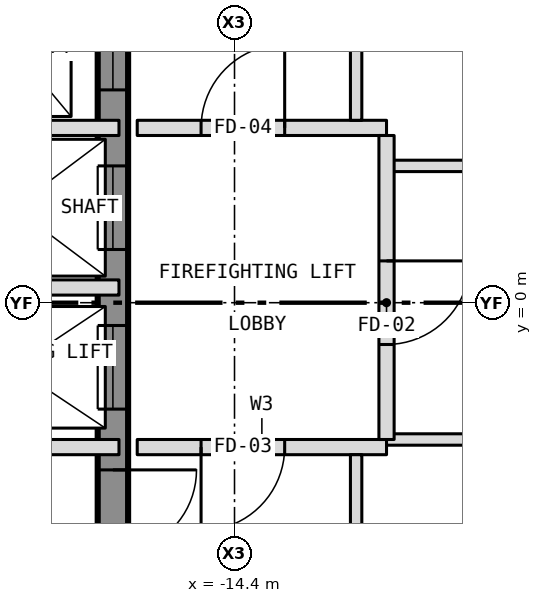
"""IFC4 building model, lengths in metres.
Left out: names, types, materials, properties, quantities, classifications, styles, units other than length and angle.
Written with IfcOpenShell. Run it as: python <this file> out.ifc"""

import sys

from ifc_helpers import new_model, si_unit, direction, frame, frame_2d, origin, place, context, subcontext, project, spatial, rectangle, extrude, element, fill, save


model = new_model("IFC4")
c1 = context("Model", 3, precision=1e-05, world=origin(), true_north=direction((0.0, 1.0)))
c2 = subcontext(c1, "Body", "Model", "MODEL_VIEW")
j1 = project(units=[si_unit("LENGTHUNIT", "METRE"), si_unit("PLANEANGLEUNIT", "RADIAN")], contexts=[c1])
p1 = place(None, origin())
s1 = spatial("IfcSite", under=j1, at=p1, CompositionType="ELEMENT")
p2 = place(p1, origin())
s2 = spatial("IfcBuilding", under=s1, at=p2, CompositionType="ELEMENT")
p3 = place(p2, frame((0.0, 0.0, 233.0)))
s3 = spatial("IfcBuildingStorey", under=s2, at=p3, CompositionType="ELEMENT", Elevation=233.0)
p4 = place(p3, frame((-16.0, -10.8, 0.0), z_axis=(0.0, 0.0, 1.0), x_axis=(0.0, 1.0, 0.0)))
e1 = element("IfcWall", 1, at=p4, inside=s3, PredefinedType="SHEAR", context=c2, shape_type="SweptSolid", body=[
    extrude(rectangle(XDim=21.6, YDim=0.4, at=frame_2d((10.8, 0.0))), origin(), (0.0, 0.0, 1.0), 2.9),
])
p5 = place(p4, frame((9.4, 0.0, 0.0)))
e2 = element("IfcOpeningElement", 2, at=p5, cuts=e1, PredefinedType="OPENING", context=c2, shape_type="SweptSolid", body=[
    extrude(rectangle(XDim=1.1, YDim=2.1, at=frame_2d((0.55, 1.05))), frame((0.0, 0.212, 0.0), z_axis=(0.0, -1.0, 0.0), x_axis=(1.0, 0.0, 0.0)), (0.0, 0.0, 1.0), 0.424),
])
p6 = place(p4, frame((11.5, 0.0, 0.0)))
e3 = element("IfcOpeningElement", 3, at=p6, cuts=e1, PredefinedType="OPENING", context=c2, shape_type="SweptSolid", body=[
    extrude(rectangle(XDim=1.1, YDim=2.1, at=frame_2d((0.55, 1.05))), frame((0.0, 0.212, 0.0), z_axis=(0.0, -1.0, 0.0), x_axis=(1.0, 0.0, 0.0)), (0.0, 0.0, 1.0), 0.424),
])
p7 = place(p4, frame((13.6, 0.0, 0.0)))
e4 = element("IfcOpeningElement", 4, at=p7, cuts=e1, PredefinedType="OPENING", context=c2, shape_type="SweptSolid", body=[
    extrude(rectangle(XDim=1.1, YDim=2.1, at=frame_2d((0.55, 1.05))), frame((0.0, 0.212, 0.0), z_axis=(0.0, -1.0, 0.0), x_axis=(1.0, 0.0, 0.0)), (0.0, 0.0, 1.0), 0.424),
])
p8 = place(p4, frame((15.7, 0.0, 0.0)))
e5 = element("IfcOpeningElement", 5, at=p8, cuts=e1, PredefinedType="OPENING", context=c2, shape_type="SweptSolid", body=[
    extrude(rectangle(XDim=1.1, YDim=2.1, at=frame_2d((0.55, 1.05))), frame((0.0, 0.212, 0.0), z_axis=(0.0, -1.0, 0.0), x_axis=(1.0, 0.0, 0.0)), (0.0, 0.0, 1.0), 0.424),
])
p9 = place(p4, frame((17.8, 0.0, 0.0)))
e6 = element("IfcOpeningElement", 6, at=p9, cuts=e1, PredefinedType="OPENING", context=c2, shape_type="SweptSolid", body=[
    extrude(rectangle(XDim=1.1, YDim=2.1, at=frame_2d((0.55, 1.05))), frame((0.0, 0.212, 0.0), z_axis=(0.0, -1.0, 0.0), x_axis=(1.0, 0.0, 0.0)), (0.0, 0.0, 1.0), 0.424),
])
p10 = place(p4, frame((0.458, 0.0, 0.0)))
e7 = element("IfcOpeningElement", 7, at=p10, cuts=e1, PredefinedType="OPENING", context=c2, shape_type="SweptSolid", body=[
    extrude(rectangle(XDim=1.1, YDim=2.1, at=frame_2d((0.55, 1.05))), frame((0.0, 0.212, 0.0), z_axis=(0.0, -1.0, 0.0), x_axis=(1.0, 0.0, 0.0)), (0.0, 0.0, 1.0), 0.424),
])
p11 = place(p4, frame((7.5, 0.0, 0.0)))
e8 = element("IfcOpeningElement", 8, at=p11, cuts=e1, PredefinedType="OPENING", context=c2, shape_type="SweptSolid", body=[
    extrude(rectangle(XDim=1.1, YDim=2.1, at=frame_2d((0.55, 1.05))), frame((0.0, 0.212, 0.0), z_axis=(0.0, -1.0, 0.0), x_axis=(1.0, 0.0, 0.0)), (0.0, 0.0, 1.0), 0.424),
])
p12 = place(p4, frame((20.0, 0.0, 0.0)))
e9 = element("IfcOpeningElement", 9, at=p12, cuts=e1, PredefinedType="OPENING", context=c2, shape_type="SweptSolid", body=[
    extrude(rectangle(XDim=0.9, YDim=2.1, at=frame_2d((0.45, 1.05))), frame((0.0, 0.212, 0.0), z_axis=(0.0, -1.0, 0.0), x_axis=(1.0, 0.0, 0.0)), (0.0, 0.0, 1.0), 0.424),
])
p13 = place(p3, frame((-20.28, -1.9, 0.0), z_axis=(0.0, 0.0, 1.0), x_axis=(1.0, 0.0, 0.0)))
e10 = element("IfcWall", 10, at=p13, inside=s3, PredefinedType="PARTITIONING", context=c2, shape_type="SweptSolid", body=[
    extrude(rectangle(XDim=4.36, YDim=0.2, at=frame_2d((2.18, 0.0))), origin(), (0.0, 0.0, 1.0), 2.9),
])
p14 = place(p3, frame((-15.68, -1.9, 0.0), z_axis=(0.0, 0.0, 1.0), x_axis=(1.0, 0.0, 0.0)))
e11 = element("IfcWall", 11, at=p14, inside=s3, PredefinedType="PARTITIONING", context=c2, shape_type="SweptSolid", body=[
    extrude(rectangle(XDim=3.28, YDim=0.2, at=frame_2d((1.64, 0.0))), origin(), (0.0, 0.0, 1.0), 3.2),
])
p15 = place(p14, frame((0.84, 0.0, 0.0)))
e12 = element("IfcOpeningElement", 12, at=p15, cuts=e11, PredefinedType="OPENING", context=c2, shape_type="SweptSolid", body=[
    extrude(rectangle(XDim=1.1, YDim=2.1, at=frame_2d((0.55, 1.05))), frame((0.0, 0.112, 0.0), z_axis=(0.0, -1.0, 0.0), x_axis=(1.0, 0.0, 0.0)), (0.0, 0.0, 1.0), 0.224),
])
p16 = place(p3, frame((-12.4, -1.8, 0.0), z_axis=(0.0, 0.0, 1.0), x_axis=(1.0, 0.0, 0.0)))
e13 = element("IfcWall", 13, at=p16, inside=s3, PredefinedType="PARTITIONING", context=c2, shape_type="SweptSolid", body=[
    extrude(rectangle(XDim=5.78, YDim=0.15, at=frame_2d((2.89, 0.0))), origin(), (0.0, 0.0, 1.0), 3.2),
])
p17 = place(p3, frame((-18.8, 0.2, 0.0), z_axis=(0.0, 0.0, 1.0), x_axis=(1.0, 0.0, 0.0)))
e14 = element("IfcWall", 14, at=p17, inside=s3, PredefinedType="PARTITIONING", context=c2, shape_type="SweptSolid", body=[
    extrude(rectangle(XDim=2.88, YDim=0.2, at=frame_2d((1.44, 0.0))), origin(), (0.0, 0.0, 1.0), 2.9),
])
p18 = place(p3, frame((-12.4, 1.8, 0.0), z_axis=(0.0, 0.0, 1.0), x_axis=(1.0, 0.0, 0.0)))
e15 = element("IfcWall", 15, at=p18, inside=s3, PredefinedType="PARTITIONING", context=c2, shape_type="SweptSolid", body=[
    extrude(rectangle(XDim=5.78, YDim=0.15, at=frame_2d((2.89, 0.0))), origin(), (0.0, 0.0, 1.0), 3.2),
])
p19 = place(p3, frame((-18.8, 2.3, 0.0), z_axis=(0.0, 0.0, 1.0), x_axis=(1.0, 0.0, 0.0)))
e16 = element("IfcWall", 16, at=p19, inside=s3, PredefinedType="PARTITIONING", context=c2, shape_type="SweptSolid", body=[
    extrude(rectangle(XDim=2.88, YDim=0.2, at=frame_2d((1.44, 0.0))), origin(), (0.0, 0.0, 1.0), 2.9),
])
p20 = place(p3, frame((-15.68, 2.3, 0.0), z_axis=(0.0, 0.0, 1.0), x_axis=(1.0, 0.0, 0.0)))
e17 = element("IfcWall", 17, at=p20, inside=s3, PredefinedType="PARTITIONING", context=c2, shape_type="SweptSolid", body=[
    extrude(rectangle(XDim=3.28, YDim=0.2, at=frame_2d((1.64, 0.0))), origin(), (0.0, 0.0, 1.0), 3.2),
])
p21 = place(p20, frame((0.84, 0.0, 0.0)))
e18 = element("IfcOpeningElement", 18, at=p21, cuts=e17, PredefinedType="OPENING", context=c2, shape_type="SweptSolid", body=[
    extrude(rectangle(XDim=1.1, YDim=2.1, at=frame_2d((0.55, 1.05))), frame((0.0, 0.112, 0.0), z_axis=(0.0, -1.0, 0.0), x_axis=(1.0, 0.0, 0.0)), (0.0, 0.0, 1.0), 0.224),
])
p22 = place(p3, frame((-12.8, -10.525, 0.0), z_axis=(0.0, 0.0, 1.0), x_axis=(0.0, 1.0, 0.0)))
e19 = element("IfcWall", 19, at=p22, inside=s3, PredefinedType="PARTITIONING", context=c2, shape_type="SweptSolid", body=[
    extrude(rectangle(XDim=8.525, YDim=0.15, at=frame_2d((4.262, 0.0))), origin(), (0.0, 0.0, 1.0), 3.2),
])
p23 = place(p22, frame((3.825, 0.0, 0.0)))
e20 = element("IfcOpeningElement", 20, at=p23, cuts=e19, PredefinedType="OPENING", context=c2, shape_type="SweptSolid", body=[
    extrude(rectangle(XDim=0.9, YDim=2.1, at=frame_2d((0.45, 1.05))), frame((0.0, 0.087, 0.0), z_axis=(0.0, -1.0, 0.0), x_axis=(1.0, 0.0, 0.0)), (0.0, 0.0, 1.0), 0.174),
])
p24 = place(p3, frame((-12.8, 2.4, 0.0), z_axis=(0.0, 0.0, 1.0), x_axis=(0.0, 1.0, 0.0)))
e21 = element("IfcWall", 21, at=p24, inside=s3, PredefinedType="PARTITIONING", context=c2, shape_type="SweptSolid", body=[
    extrude(rectangle(XDim=3.425, YDim=0.15, at=frame_2d((1.712, 0.0))), origin(), (0.0, 0.0, 1.0), 3.2),
])
p25 = place(p3, frame((-12.4, -1.8, 0.0), z_axis=(0.0, 0.0, 1.0), x_axis=(0.0, 1.0, 0.0)))
e22 = element("IfcWall", 22, at=p25, inside=s3, PredefinedType="PARTITIONING", context=c2, shape_type="SweptSolid", body=[
    extrude(rectangle(XDim=4.0, YDim=0.2, at=frame_2d((2.0, 0.0))), origin(), (0.0, 0.0, 1.0), 3.2),
])
p26 = place(p25, frame((1.25, 0.0, 0.0)))
e23 = element("IfcOpeningElement", 23, at=p26, cuts=e22, PredefinedType="OPENING", context=c2, shape_type="SweptSolid", body=[
    extrude(rectangle(XDim=1.1, YDim=2.1, at=frame_2d((0.55, 1.05))), frame((0.0, 0.112, 0.0), z_axis=(0.0, -1.0, 0.0), x_axis=(1.0, 0.0, 0.0)), (0.0, 0.0, 1.0), 0.224),
])
p27 = place(p5, origin())
e24 = element("IfcDoor", 24, at=p27, inside=s3, OperationType="SLIDING_TO_LEFT", PredefinedType="DOOR", context=c2, shape_type="SweptSolid", body=[
    extrude(rectangle(XDim=1.1, YDim=2.1, at=frame_2d((0.55, 1.05))), frame((0.0, 0.025, 0.0), z_axis=(0.0, -1.0, 0.0), x_axis=(1.0, 0.0, 0.0)), (0.0, 0.0, 1.0), 0.05),
])
fill(e2, e24)
p28 = place(p6, origin())
e25 = element("IfcDoor", 25, at=p28, inside=s3, OperationType="SLIDING_TO_LEFT", PredefinedType="DOOR", context=c2, shape_type="SweptSolid", body=[
    extrude(rectangle(XDim=1.1, YDim=2.1, at=frame_2d((0.55, 1.05))), frame((0.0, 0.025, 0.0), z_axis=(0.0, -1.0, 0.0), x_axis=(1.0, 0.0, 0.0)), (0.0, 0.0, 1.0), 0.05),
])
fill(e3, e25)
p29 = place(p7, origin())
e26 = element("IfcDoor", 26, at=p29, inside=s3, OperationType="SLIDING_TO_LEFT", PredefinedType="DOOR", context=c2, shape_type="SweptSolid", body=[
    extrude(rectangle(XDim=1.1, YDim=2.1, at=frame_2d((0.55, 1.05))), frame((0.0, 0.025, 0.0), z_axis=(0.0, -1.0, 0.0), x_axis=(1.0, 0.0, 0.0)), (0.0, 0.0, 1.0), 0.05),
])
fill(e4, e26)
p30 = place(p11, origin())
e27 = element("IfcDoor", 27, at=p30, inside=s3, OperationType="SINGLE_SWING_RIGHT", PredefinedType="DOOR", context=c2, shape_type="SweptSolid", body=[
    extrude(rectangle(XDim=1.1, YDim=2.1, at=frame_2d((0.55, 1.05))), frame((0.0, 0.025, 0.0), z_axis=(0.0, -1.0, 0.0), x_axis=(1.0, 0.0, 0.0)), (0.0, 0.0, 1.0), 0.05),
])
fill(e8, e27)
p31 = place(p26, origin())
e28 = element("IfcDoor", 28, at=p31, inside=s3, OperationType="SINGLE_SWING_RIGHT", PredefinedType="DOOR", context=c2, shape_type="SweptSolid", body=[
    extrude(rectangle(XDim=1.1, YDim=2.1, at=frame_2d((0.55, 1.05))), frame((0.0, 0.025, 0.0), z_axis=(0.0, -1.0, 0.0), x_axis=(1.0, 0.0, 0.0)), (0.0, 0.0, 1.0), 0.05),
])
fill(e23, e28)
p32 = place(p15, origin())
e29 = element("IfcDoor", 29, at=p32, inside=s3, OperationType="SINGLE_SWING_LEFT", PredefinedType="DOOR", context=c2, shape_type="SweptSolid", body=[
    extrude(rectangle(XDim=1.1, YDim=2.1, at=frame_2d((0.55, 1.05))), frame((0.0, 0.025, 0.0), z_axis=(0.0, -1.0, 0.0), x_axis=(1.0, 0.0, 0.0)), (0.0, 0.0, 1.0), 0.05),
])
fill(e12, e29)
p33 = place(p21, origin())
e30 = element("IfcDoor", 30, at=p33, inside=s3, OperationType="SINGLE_SWING_RIGHT", PredefinedType="DOOR", context=c2, shape_type="SweptSolid", body=[
    extrude(rectangle(XDim=1.1, YDim=2.1, at=frame_2d((0.55, 1.05))), frame((0.0, 0.025, 0.0), z_axis=(0.0, -1.0, 0.0), x_axis=(1.0, 0.0, 0.0)), (0.0, 0.0, 1.0), 0.05),
])
fill(e18, e30)
save(model, sys.argv[1])
